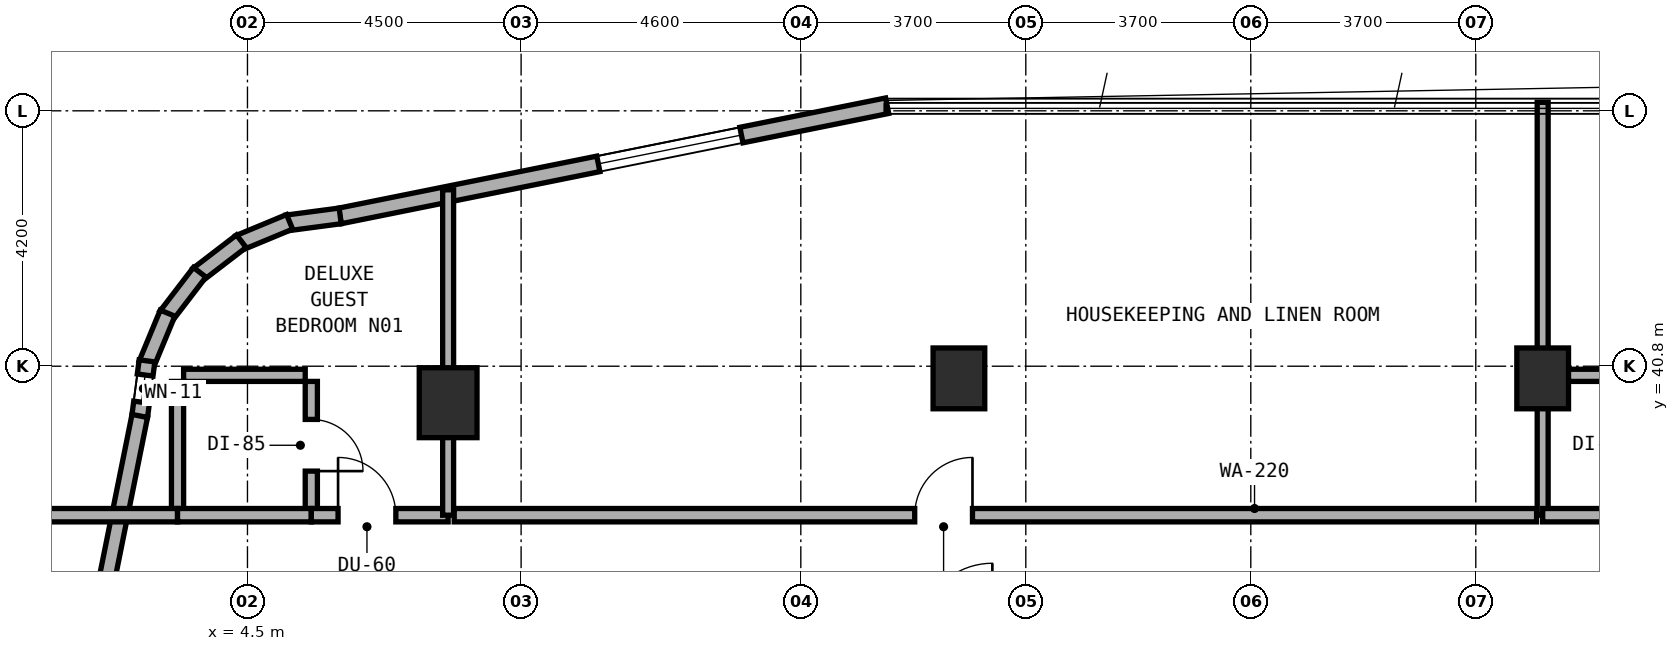
"""IFC4 building model, lengths in metres.
Left out: names, types, materials, properties, quantities, classifications, styles, units other than length and angle.
Written with IfcOpenShell. Run it as: python <this file> out.ifc"""

import sys

from ifc_helpers import new_model, si_unit, direction, frame, frame_2d, origin, origin_2d, place, context, subcontext, project, spatial, rectangle, extrude, element, fill, save


model = new_model("IFC4")
c1 = context("Model", 3, precision=1e-05, world=origin(), true_north=direction((0.0, 1.0)))
c2 = subcontext(c1, "Body", "Model", "MODEL_VIEW")
j1 = project(units=[si_unit("LENGTHUNIT", "METRE"), si_unit("PLANEANGLEUNIT", "RADIAN")], contexts=[c1])
p1 = place(None, origin())
s1 = spatial("IfcSite", under=j1, at=p1, CompositionType="ELEMENT")
p2 = place(p1, origin())
s2 = spatial("IfcBuilding", under=s1, at=p2, CompositionType="ELEMENT")
p3 = place(p2, frame((0.0, 0.0, 127.5)))
s3 = spatial("IfcBuildingStorey", under=s2, at=p3, CompositionType="ELEMENT", Elevation=127.5)
for number, where, z_axis, x_axis in (
    (1, (16.2, 40.6, 0.0), (0.0, 0.0, 1.0), (1.0, 0.0, 0.0)),
    (2, (25.8, 40.6, 0.0), (0.0, 0.0, 1.0), (1.0, 0.0, 0.0)),
):
    element("IfcColumn", number, at=place(p3, frame(where, z_axis=z_axis, x_axis=x_axis)), inside=s3, PredefinedType="COLUMN", context=c2, shape_type="SweptSolid", body=[
        extrude(rectangle(XDim=0.85, YDim=1.0, at=origin_2d()), origin(), (0.0, 0.0, 1.0), 3.5),
    ])
p4 = place(p3, frame((7.8, 40.2, 0.0), z_axis=(0.0, 0.0, 1.0), x_axis=(1.0, 0.0, 0.0)))
e3 = element("IfcColumn", 3, at=p4, inside=s3, PredefinedType="COLUMN", context=c2, shape_type="SweptSolid", body=[
    extrude(rectangle(XDim=0.95, YDim=1.15, at=origin_2d()), origin(), (0.0, 0.0, 1.0), 3.5),
])
p5 = place(p3, frame((15.02, 45.084, 0.0), z_axis=(0.0, 0.0, 1.0), x_axis=(-0.980315963543, -0.197435082048, 0.0)))
e4 = element("IfcWall", 4, at=p5, inside=s3, PredefinedType="STANDARD", context=c2, shape_type="SweptSolid", body=[
    extrude(rectangle(XDim=9.183, YDim=0.26, at=frame_2d((4.591, 0.0))), origin(), (0.0, 0.0, 1.0), 3.22),
])
p6 = place(p5, frame((2.445, 0.0, 0.8)))
e5 = element("IfcOpeningElement", 5, at=p6, cuts=e4, PredefinedType="OPENING", context=c2, shape_type="SweptSolid", body=[
    extrude(rectangle(XDim=2.4, YDim=1.6, at=frame_2d((1.2, 0.8))), frame((0.0, 0.14, 0.0), z_axis=(0.0, -1.0, 0.0), x_axis=(1.0, 0.0, 0.0)), (0.0, 0.0, 1.0), 0.28),
])
p7 = place(p3, frame((6.025, 43.272, 0.0), z_axis=(0.0, 0.0, 1.0), x_axis=(-0.991388484223, -0.130953706898, 0.0)))
e6 = element("IfcWall", 6, at=p7, inside=s3, PredefinedType="STANDARD", context=c2, shape_type="SweptSolid", body=[
    extrude(rectangle(XDim=0.885, YDim=0.26, at=frame_2d((0.443, 0.0))), origin(), (0.0, 0.0, 1.0), 3.22),
])
p8 = place(p3, frame((5.193, 43.174, 0.0), z_axis=(0.0, 0.0, 1.0), x_axis=(-0.923627776508, -0.383290660547, 0.0)))
e7 = element("IfcWall", 7, at=p8, inside=s3, PredefinedType="STANDARD", context=c2, shape_type="SweptSolid", body=[
    extrude(rectangle(XDim=0.903, YDim=0.26, at=frame_2d((0.452, 0.0))), origin(), (0.0, 0.0, 1.0), 3.22),
])
p9 = place(p3, frame((4.399, 42.856, 0.0), z_axis=(0.0, 0.0, 1.0), x_axis=(-0.793458244748, -0.608624690463, 0.0)))
e8 = element("IfcWall", 8, at=p9, inside=s3, PredefinedType="STANDARD", context=c2, shape_type="SweptSolid", body=[
    extrude(rectangle(XDim=0.902, YDim=0.26, at=frame_2d((0.451, 0.0))), origin(), (0.0, 0.0, 1.0), 3.22),
])
p10 = place(p3, frame((3.714, 42.345, 0.0), z_axis=(0.0, 0.0, 1.0), x_axis=(-0.608494022858, -0.793558456666, 0.0)))
e9 = element("IfcWall", 9, at=p10, inside=s3, PredefinedType="STANDARD", context=c2, shape_type="SweptSolid", body=[
    extrude(rectangle(XDim=0.902, YDim=0.26, at=frame_2d((0.451, 0.0))), origin(), (0.0, 0.0, 1.0), 3.22),
])
p11 = place(p3, frame((3.186, 41.673, 0.0), z_axis=(0.0, 0.0, 1.0), x_axis=(-0.383155708213, -0.923683767999, 0.0)))
e10 = element("IfcWall", 10, at=p11, inside=s3, PredefinedType="STANDARD", context=c2, shape_type="SweptSolid", body=[
    extrude(rectangle(XDim=0.903, YDim=0.26, at=frame_2d((0.451, 0.0))), origin(), (0.0, 0.0, 1.0), 3.22),
])
p12 = place(p3, frame((2.848, 40.888, 0.0), z_axis=(0.0, 0.0, 1.0), x_axis=(-0.130200706103, -0.991487658083, 0.0)))
e11 = element("IfcWall", 11, at=p12, inside=s3, PredefinedType="STANDARD", context=c2, shape_type="SweptSolid", body=[
    extrude(rectangle(XDim=0.921, YDim=0.26, at=frame_2d((0.46, 0.0))), origin(), (0.0, 0.0, 1.0), 3.22),
])
p13 = place(p12, frame((0.235, 0.0, 0.85)))
e12 = element("IfcOpeningElement", 12, at=p13, cuts=e11, PredefinedType="OPENING", context=c2, shape_type="SweptSolid", body=[
    extrude(rectangle(XDim=0.45, YDim=1.5, at=frame_2d((0.225, 0.75))), frame((0.0, 0.14, 0.0), z_axis=(0.0, -1.0, 0.0), x_axis=(1.0, 0.0, 0.0)), (0.0, 0.0, 1.0), 0.28),
])
p14 = place(p3, frame((2.729, 39.982, 0.0), z_axis=(0.0, 0.0, 1.0), x_axis=(-0.197435082048, -0.980315963543, 0.0)))
e13 = element("IfcWall", 13, at=p14, inside=s3, PredefinedType="STANDARD", context=c2, shape_type="SweptSolid", body=[
    extrude(rectangle(XDim=9.183, YDim=0.26, at=frame_2d((4.591, 0.0))), origin(), (0.0, 0.0, 1.0), 3.22),
])
p15 = place(p14, frame((4.286, 0.0, 0.8)))
e14 = element("IfcOpeningElement", 14, at=p15, cuts=e13, PredefinedType="OPENING", context=c2, shape_type="SweptSolid", body=[
    extrude(rectangle(XDim=2.4, YDim=1.6, at=frame_2d((1.2, 0.8))), frame((0.0, 0.14, 0.0), z_axis=(0.0, -1.0, 0.0), x_axis=(1.0, 0.0, 0.0)), (0.0, 0.0, 1.0), 0.28),
])
p16 = place(p3, frame((5.55, 38.45, 0.0), z_axis=(0.0, 0.0, 1.0), x_axis=(0.0, 1.0, 0.0)))
e15 = element("IfcWall", 15, at=p16, inside=s3, PredefinedType="PLUMBINGWALL", context=c2, shape_type="SweptSolid", body=[
    extrude(rectangle(XDim=2.1, YDim=0.2, at=frame_2d((1.05, 0.0))), origin(), (0.0, 0.0, 1.0), 3.22),
])
p17 = place(p16, frame((0.625, 0.0, 0.0)))
e16 = element("IfcOpeningElement", 16, at=p17, cuts=e15, PredefinedType="OPENING", context=c2, shape_type="SweptSolid", body=[
    extrude(rectangle(XDim=0.85, YDim=2.1, at=frame_2d((0.425, 1.05))), frame((0.0, 0.11, 0.0), z_axis=(0.0, -1.0, 0.0), x_axis=(1.0, 0.0, 0.0)), (0.0, 0.0, 1.0), 0.22),
])
p18 = place(p3, frame((3.45, 40.65, 0.0), z_axis=(0.0, 0.0, 1.0), x_axis=(1.0, 0.0, 0.0)))
e17 = element("IfcWall", 17, at=p18, inside=s3, PredefinedType="PLUMBINGWALL", context=c2, shape_type="SweptSolid", body=[
    extrude(rectangle(XDim=2.0, YDim=0.2, at=frame_2d((1.0, 0.0))), origin(), (0.0, 0.0, 1.0), 3.22),
])
p19 = place(p3, frame((3.35, 38.45, 0.0), z_axis=(0.0, 0.0, 1.0), x_axis=(0.0, 1.0, 0.0)))
e18 = element("IfcWall", 18, at=p19, inside=s3, PredefinedType="PLUMBINGWALL", context=c2, shape_type="SweptSolid", body=[
    extrude(rectangle(XDim=2.1, YDim=0.2, at=frame_2d((1.05, 0.0))), origin(), (0.0, 0.0, 1.0), 3.22),
])
p20 = place(p3, frame((0.96, 38.35, 0.0), z_axis=(0.0, 0.0, 1.0), x_axis=(1.0, 0.0, 0.0)))
e19 = element("IfcWall", 19, at=p20, inside=s3, PredefinedType="SOLIDWALL", context=c2, shape_type="SweptSolid", body=[
    extrude(rectangle(XDim=2.39, YDim=0.22, at=frame_2d((1.195, 0.0))), origin(), (0.0, 0.0, 1.0), 3.22),
])
p21 = place(p3, frame((3.35, 38.35, 0.0), z_axis=(0.0, 0.0, 1.0), x_axis=(1.0, 0.0, 0.0)))
e20 = element("IfcWall", 20, at=p21, inside=s3, PredefinedType="SOLIDWALL", context=c2, shape_type="SweptSolid", body=[
    extrude(rectangle(XDim=2.2, YDim=0.22, at=frame_2d((1.1, 0.0))), origin(), (0.0, 0.0, 1.0), 3.22),
])
p22 = place(p3, frame((5.55, 38.35, 0.0), z_axis=(0.0, 0.0, 1.0), x_axis=(1.0, 0.0, 0.0)))
e21 = element("IfcWall", 21, at=p22, inside=s3, PredefinedType="SOLIDWALL", context=c2, shape_type="SweptSolid", body=[
    extrude(rectangle(XDim=2.25, YDim=0.22, at=frame_2d((1.125, 0.0))), origin(), (0.0, 0.0, 1.0), 2.695),
])
p23 = place(p22, frame((0.44, 0.0, 0.0)))
e22 = element("IfcOpeningElement", 22, at=p23, cuts=e21, PredefinedType="OPENING", context=c2, shape_type="SweptSolid", body=[
    extrude(rectangle(XDim=0.95, YDim=2.1, at=frame_2d((0.475, 1.05))), frame((0.0, 0.12, 0.0), z_axis=(0.0, -1.0, 0.0), x_axis=(1.0, 0.0, 0.0)), (0.0, 0.0, 1.0), 0.24),
])
p24 = place(p3, frame((7.8, 38.35, 0.0), z_axis=(0.0, 0.0, 1.0), x_axis=(0.0, 1.0, 0.0)))
e23 = element("IfcWall", 23, at=p24, inside=s3, PredefinedType="SOLIDWALL", context=c2, shape_type="SweptSolid", body=[
    extrude(rectangle(XDim=5.351, YDim=0.18, at=frame_2d((2.675, 0.0))), origin(), (0.0, 0.0, 1.0), 2.695),
])
p25 = place(p3, frame((7.9, 38.35, 0.0), z_axis=(0.0, 0.0, 1.0), x_axis=(1.0, 0.0, 0.0)))
e24 = element("IfcWall", 24, at=p25, inside=s3, PredefinedType="SOLIDWALL", context=c2, shape_type="SweptSolid", body=[
    extrude(rectangle(XDim=17.8, YDim=0.22, at=frame_2d((8.9, 0.0))), origin(), (0.0, 0.0, 1.0), 2.695),
])
p26 = place(p25, frame((7.573, 0.0, 0.0)))
e25 = element("IfcOpeningElement", 25, at=p26, cuts=e24, PredefinedType="OPENING", context=c2, shape_type="SweptSolid", body=[
    extrude(rectangle(XDim=0.95, YDim=2.1, at=frame_2d((0.475, 1.05))), frame((0.0, 0.12, 0.0), z_axis=(0.0, -1.0, 0.0), x_axis=(1.0, 0.0, 0.0)), (0.0, 0.0, 1.0), 0.24),
])
p27 = place(p3, frame((25.8, 38.35, 0.0), z_axis=(0.0, 0.0, 1.0), x_axis=(0.0, 1.0, 0.0)))
e26 = element("IfcWall", 26, at=p27, inside=s3, PredefinedType="SOLIDWALL", context=c2, shape_type="SweptSolid", body=[
    extrude(rectangle(XDim=6.79, YDim=0.18, at=frame_2d((3.395, 0.0))), origin(), (0.0, 0.0, 1.0), 2.695),
])
p28 = place(p3, frame((25.9, 40.65, 0.0), z_axis=(0.0, 0.0, 1.0), x_axis=(1.0, 0.0, 0.0)))
e27 = element("IfcWall", 27, at=p28, inside=s3, PredefinedType="PLUMBINGWALL", context=c2, shape_type="SweptSolid", body=[
    extrude(rectangle(XDim=2.0, YDim=0.2, at=frame_2d((1.0, 0.0))), origin(), (0.0, 0.0, 1.0), 2.835),
])
p29 = place(p3, frame((25.8, 38.35, 0.0), z_axis=(0.0, 0.0, 1.0), x_axis=(1.0, 0.0, 0.0)))
e28 = element("IfcWall", 28, at=p29, inside=s3, PredefinedType="SOLIDWALL", context=c2, shape_type="SweptSolid", body=[
    extrude(rectangle(XDim=2.2, YDim=0.22, at=frame_2d((1.1, 0.0))), origin(), (0.0, 0.0, 1.0), 2.695),
])
p30 = place(p6, origin())
e29 = element("IfcWindow", 29, at=p30, inside=s3, PartitioningType="SINGLE_PANEL", PredefinedType="WINDOW", context=c2, shape_type="SweptSolid", body=[
    extrude(rectangle(XDim=2.4, YDim=1.6, at=frame_2d((1.2, 0.8))), frame((0.0, 0.03, 0.0), z_axis=(0.0, -1.0, 0.0), x_axis=(1.0, 0.0, 0.0)), (0.0, 0.0, 1.0), 0.06),
])
fill(e5, e29)
p31 = place(p13, origin())
e30 = element("IfcWindow", 30, at=p31, inside=s3, PartitioningType="SINGLE_PANEL", PredefinedType="WINDOW", context=c2, shape_type="SweptSolid", body=[
    extrude(rectangle(XDim=0.45, YDim=1.5, at=frame_2d((0.225, 0.75))), frame((0.0, 0.03, 0.0), z_axis=(0.0, -1.0, 0.0), x_axis=(1.0, 0.0, 0.0)), (0.0, 0.0, 1.0), 0.06),
])
fill(e12, e30)
p32 = place(p17, frame((0.85, 0.0, 0.0), z_axis=(0.0, 0.0, 1.0), x_axis=(-1.0, 0.0, 0.0)))
e31 = element("IfcDoor", 31, at=p32, inside=s3, OperationType="SINGLE_SWING_RIGHT", PredefinedType="DOOR", context=c2, shape_type="SweptSolid", body=[
    extrude(rectangle(XDim=0.85, YDim=2.1, at=frame_2d((0.425, 1.05))), frame((0.0, 0.025, 0.0), z_axis=(0.0, -1.0, 0.0), x_axis=(1.0, 0.0, 0.0)), (0.0, 0.0, 1.0), 0.05),
])
fill(e16, e31)
p33 = place(p23, origin())
e32 = element("IfcDoor", 32, at=p33, inside=s3, OperationType="SINGLE_SWING_LEFT", PredefinedType="DOOR", context=c2, shape_type="SweptSolid", body=[
    extrude(rectangle(XDim=0.95, YDim=2.1, at=frame_2d((0.475, 1.05))), frame((0.0, 0.025, 0.0), z_axis=(0.0, -1.0, 0.0), x_axis=(1.0, 0.0, 0.0)), (0.0, 0.0, 1.0), 0.05),
])
fill(e22, e32)
p34 = place(p26, origin())
e33 = element("IfcDoor", 33, at=p34, inside=s3, OperationType="SINGLE_SWING_RIGHT", PredefinedType="DOOR", context=c2, shape_type="SweptSolid", body=[
    extrude(rectangle(XDim=0.95, YDim=2.1, at=frame_2d((0.475, 1.05))), frame((0.0, 0.025, 0.0), z_axis=(0.0, -1.0, 0.0), x_axis=(1.0, 0.0, 0.0)), (0.0, 0.0, 1.0), 0.05),
])
fill(e25, e33)
save(model, sys.argv[1])
